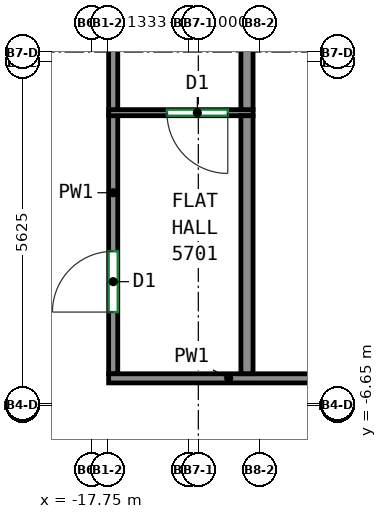
"""IFC4 building model, lengths in metres.
Left out: names, types, materials, properties, quantities, classifications, styles, units other than length and angle.
Written with IfcOpenShell. Run it as: python <this file> out.ifc"""

import sys

from ifc_helpers import new_model, si_unit, direction, frame, frame_2d, origin, place, context, subcontext, project, spatial, rectangle, extrude, element, fill, save


model = new_model("IFC4")
c1 = context("Model", 3, precision=1e-05, world=origin(), true_north=direction((0.0, 1.0)))
c2 = subcontext(c1, "Body", "Model", "MODEL_VIEW")
j1 = project(units=[si_unit("LENGTHUNIT", "METRE"), si_unit("PLANEANGLEUNIT", "RADIAN")], contexts=[c1])
p1 = place(None, origin())
s1 = spatial("IfcSite", under=j1, at=p1, CompositionType="ELEMENT")
p2 = place(p1, origin())
s2 = spatial("IfcBuilding", under=s1, at=p2, CompositionType="ELEMENT")
p3 = place(p2, frame((0.0, 0.0, 239.0)))
s3 = spatial("IfcBuildingStorey", under=s2, at=p3, CompositionType="ELEMENT", Elevation=239.0)
p4 = place(p3, frame((-17.4, -6.125, 0.0), z_axis=(0.0, 0.0, 1.0), x_axis=(0.0, 1.0, 0.0)))
e1 = element("IfcWall", 1, at=p4, inside=s3, PredefinedType="PARTITIONING", context=c2, shape_type="SweptSolid", body=[
    extrude(rectangle(XDim=4.254, YDim=0.15, at=frame_2d((2.127, 0.0))), origin(), (0.0, 0.0, 1.0), 3.12),
])
p5 = place(p4, frame((1.015, 0.0, 0.0)))
e2 = element("IfcOpeningElement", 2, at=p5, cuts=e1, PredefinedType="OPENING", context=c2, shape_type="SweptSolid", body=[
    extrude(rectangle(XDim=1.0, YDim=2.1, at=frame_2d((0.5, 1.05))), frame((0.0, 0.085, 0.0), z_axis=(0.0, -1.0, 0.0), x_axis=(1.0, 0.0, 0.0)), (0.0, 0.0, 1.0), 0.17),
])
p6 = place(p3, frame((-17.475, -6.2, 0.0), z_axis=(0.0, 0.0, 1.0), x_axis=(1.0, 0.0, 0.0)))
e3 = element("IfcWall", 3, at=p6, inside=s3, PredefinedType="PARTITIONING", context=c2, shape_type="SweptSolid", body=[
    extrude(rectangle(XDim=3.95, YDim=0.15, at=frame_2d((1.975, 0.0))), origin(), (0.0, 0.0, 1.0), 3.12),
])
p7 = place(p3, frame((-17.4, -1.791, 0.0), z_axis=(0.0, 0.0, 1.0), x_axis=(0.0, 1.0, 0.0)))
e4 = element("IfcWall", 4, at=p7, inside=s3, PredefinedType="PARTITIONING", context=c2, shape_type="SweptSolid", body=[
    extrude(rectangle(XDim=5.925, YDim=0.15, at=frame_2d((2.962, 0.0))), origin(), (0.0, 0.0, 1.0), 3.12),
])
p8 = place(p3, frame((-15.1, -1.831, 0.0), z_axis=(0.0, 0.0, 1.0), x_axis=(-1.0, 0.0, 0.0)))
e5 = element("IfcWall", 5, at=p8, inside=s3, PredefinedType="PARTITIONING", context=c2, shape_type="SweptSolid", body=[
    extrude(rectangle(XDim=2.373, YDim=0.1, at=frame_2d((1.187, 0.0))), origin(), (0.0, 0.0, 1.0), 3.12),
])
p9 = place(p8, frame((0.416, 0.0, 0.0)))
e6 = element("IfcOpeningElement", 6, at=p9, cuts=e5, PredefinedType="OPENING", context=c2, shape_type="SweptSolid", body=[
    extrude(rectangle(XDim=1.0, YDim=2.1, at=frame_2d((0.5, 1.05))), frame((0.0, 0.06, 0.0), z_axis=(0.0, -1.0, 0.0), x_axis=(1.0, 0.0, 0.0)), (0.0, 0.0, 1.0), 0.12),
])
p10 = place(p3, frame((-15.2, -6.123, 0.0), z_axis=(0.0, 0.0, 1.0), x_axis=(0.0, 1.0, 0.0)))
e7 = element("IfcWall", 7, at=p10, inside=s3, PredefinedType="PARTITIONING", context=c2, shape_type="SweptSolid", body=[
    extrude(rectangle(XDim=4.242, YDim=0.2, at=frame_2d((2.121, 0.0))), origin(), (0.0, 0.0, 1.0), 3.12),
])
p11 = place(p3, frame((-15.2, -1.781, 0.0), z_axis=(0.0, 0.0, 1.0), x_axis=(0.0, 1.0, 0.0)))
e8 = element("IfcWall", 8, at=p11, inside=s3, PredefinedType="PARTITIONING", context=c2, shape_type="SweptSolid", body=[
    extrude(rectangle(XDim=5.905, YDim=0.2, at=frame_2d((2.953, 0.0))), origin(), (0.0, 0.0, 1.0), 3.12),
])
p12 = place(p5, origin())
e9 = element("IfcDoor", 9, at=p12, inside=s3, OperationType="SINGLE_SWING_LEFT", PredefinedType="DOOR", context=c2, shape_type="SweptSolid", body=[
    extrude(rectangle(XDim=1.0, YDim=2.1, at=frame_2d((0.5, 1.05))), frame((0.0, 0.025, 0.0), z_axis=(0.0, -1.0, 0.0), x_axis=(1.0, 0.0, 0.0)), (0.0, 0.0, 1.0), 0.05),
])
fill(e2, e9)
p13 = place(p9, origin())
e10 = element("IfcDoor", 10, at=p13, inside=s3, OperationType="SINGLE_SWING_LEFT", PredefinedType="DOOR", context=c2, shape_type="SweptSolid", body=[
    extrude(rectangle(XDim=1.0, YDim=2.1, at=frame_2d((0.5, 1.05))), frame((0.0, 0.025, 0.0), z_axis=(0.0, -1.0, 0.0), x_axis=(1.0, 0.0, 0.0)), (0.0, 0.0, 1.0), 0.05),
])
fill(e6, e10)
save(model, sys.argv[1])
